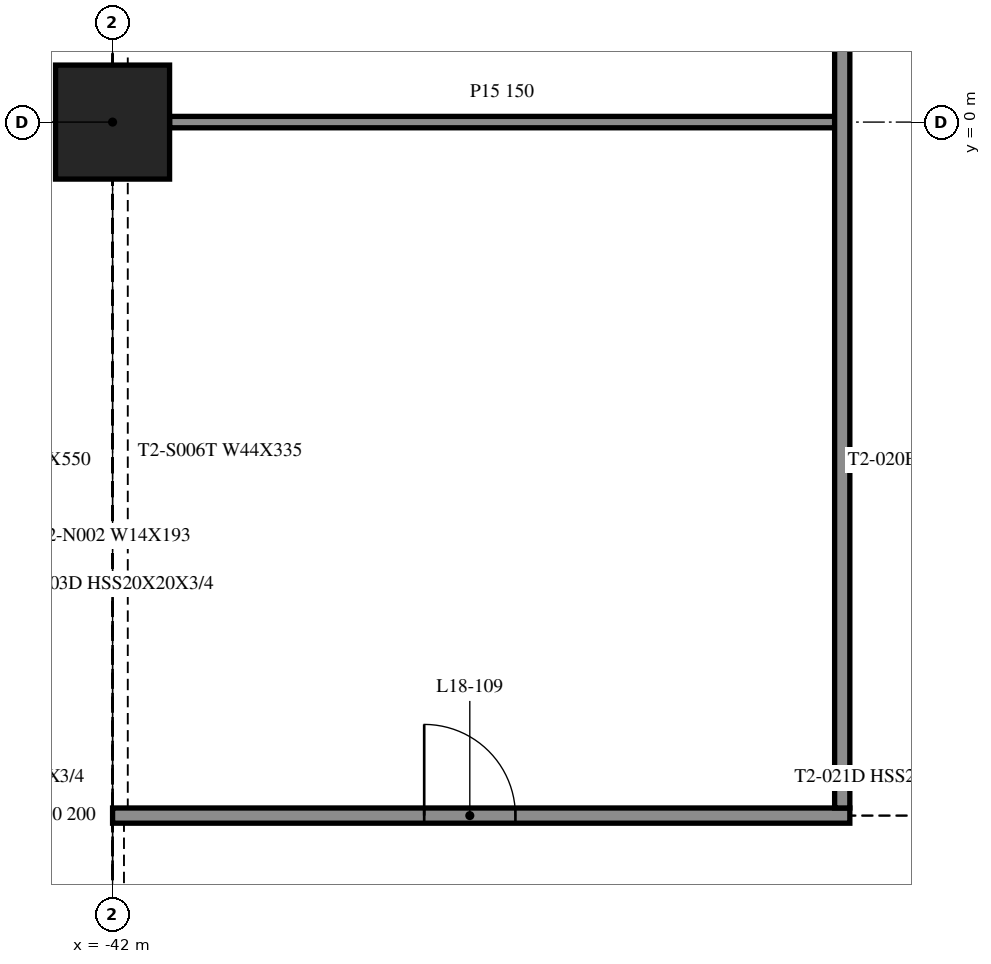
"""IFC4 building model, lengths in metres.
Left out: names, types, materials, properties, quantities, classifications, styles, units other than length and angle.
Written with IfcOpenShell. Run it as: python <this file> out.ifc"""

import sys

from ifc_helpers import new_model, si_unit, direction, frame, frame_2d, origin, origin_2d, place, context, subcontext, project, spatial, rectangle, extrude, element, fill, save


model = new_model("IFC4")
c1 = context("Model", 3, precision=1e-05, world=origin(), true_north=direction((0.0, 1.0)))
c2 = subcontext(c1, "Body", "Model", "MODEL_VIEW")
j1 = project(units=[si_unit("LENGTHUNIT", "METRE"), si_unit("PLANEANGLEUNIT", "RADIAN")], contexts=[c1])
p1 = place(None, origin())
s1 = spatial("IfcSite", under=j1, at=p1, CompositionType="ELEMENT")
p2 = place(p1, origin())
s2 = spatial("IfcBuilding", under=s1, at=p2, CompositionType="ELEMENT")
p3 = place(p2, frame((0.0, 0.0, 80.4)))
s3 = spatial("IfcBuildingStorey", under=s2, at=p3, CompositionType="ELEMENT", Elevation=80.4)
p4 = place(p3, frame((-42.0, 0.0, -0.55), z_axis=(0.0, 0.0, 1.0), x_axis=(1.0, 0.0, 0.0)))
e1 = element("IfcColumn", 1, at=p4, inside=s3, PredefinedType="COLUMN", context=c2, shape_type="SweptSolid", body=[
    extrude(rectangle(XDim=1.5, YDim=1.5, at=origin_2d()), origin(), (0.0, 0.0, 1.0), 4.61),
])
p5 = place(p3, frame((-42.0, -9.125, 0.0), z_axis=(0.0, 0.0, 1.0), x_axis=(1.0, 0.0, 0.0)))
e2 = element("IfcWall", 2, at=p5, inside=s3, PredefinedType="PARTITIONING", context=c2, shape_type="SweptSolid", body=[
    extrude(rectangle(XDim=9.7, YDim=0.2, at=frame_2d((4.85, 0.0))), origin(), (0.0, 0.0, 1.0), 4.06),
])
p6 = place(p5, frame((4.1, 0.0, 0.0)))
e3 = element("IfcOpeningElement", 3, at=p6, cuts=e2, PredefinedType="OPENING", context=c2, shape_type="SweptSolid", body=[
    extrude(rectangle(XDim=1.2, YDim=2.1, at=frame_2d((0.6, 1.05))), frame((0.0, 0.11, 0.0), z_axis=(0.0, -1.0, 0.0), x_axis=(1.0, 0.0, 0.0)), (0.0, 0.0, 1.0), 0.22),
])
p7 = place(p3, frame((-41.25, 0.0, 0.0), z_axis=(0.0, 0.0, 1.0), x_axis=(1.0, 0.0, 0.0)))
e4 = element("IfcWall", 4, at=p7, inside=s3, PredefinedType="PARTITIONING", context=c2, shape_type="SweptSolid", body=[
    extrude(rectangle(XDim=8.75, YDim=0.15, at=frame_2d((4.375, 0.0))), origin(), (0.0, 0.0, 1.0), 4.06),
])
p8 = place(p3, frame((-32.4, -9.025, 0.0), z_axis=(0.0, 0.0, 1.0), x_axis=(0.0, 1.0, 0.0)))
e5 = element("IfcWall", 5, at=p8, inside=s3, PredefinedType="PARTITIONING", context=c2, shape_type="SweptSolid", body=[
    extrude(rectangle(XDim=24.05, YDim=0.2, at=frame_2d((12.025, 0.0))), origin(), (0.0, 0.0, 1.0), 4.06),
])
p9 = place(p8, frame((11.5, 0.0, 0.0)))
e6 = element("IfcOpeningElement", 6, at=p9, cuts=e5, PredefinedType="OPENING", context=c2, shape_type="SweptSolid", body=[
    extrude(rectangle(XDim=1.0, YDim=2.1, at=frame_2d((0.5, 1.05))), frame((0.0, 0.11, 0.0), z_axis=(0.0, -1.0, 0.0), x_axis=(1.0, 0.0, 0.0)), (0.0, 0.0, 1.0), 0.22),
])
p10 = place(p6, origin())
e7 = element("IfcDoor", 7, at=p10, inside=s3, OperationType="SINGLE_SWING_LEFT", PredefinedType="DOOR", context=c2, shape_type="SweptSolid", body=[
    extrude(rectangle(XDim=1.2, YDim=2.1, at=frame_2d((0.6, 1.05))), frame((0.0, 0.025, 0.0), z_axis=(0.0, -1.0, 0.0), x_axis=(1.0, 0.0, 0.0)), (0.0, 0.0, 1.0), 0.05),
])
fill(e3, e7)
save(model, sys.argv[1])
